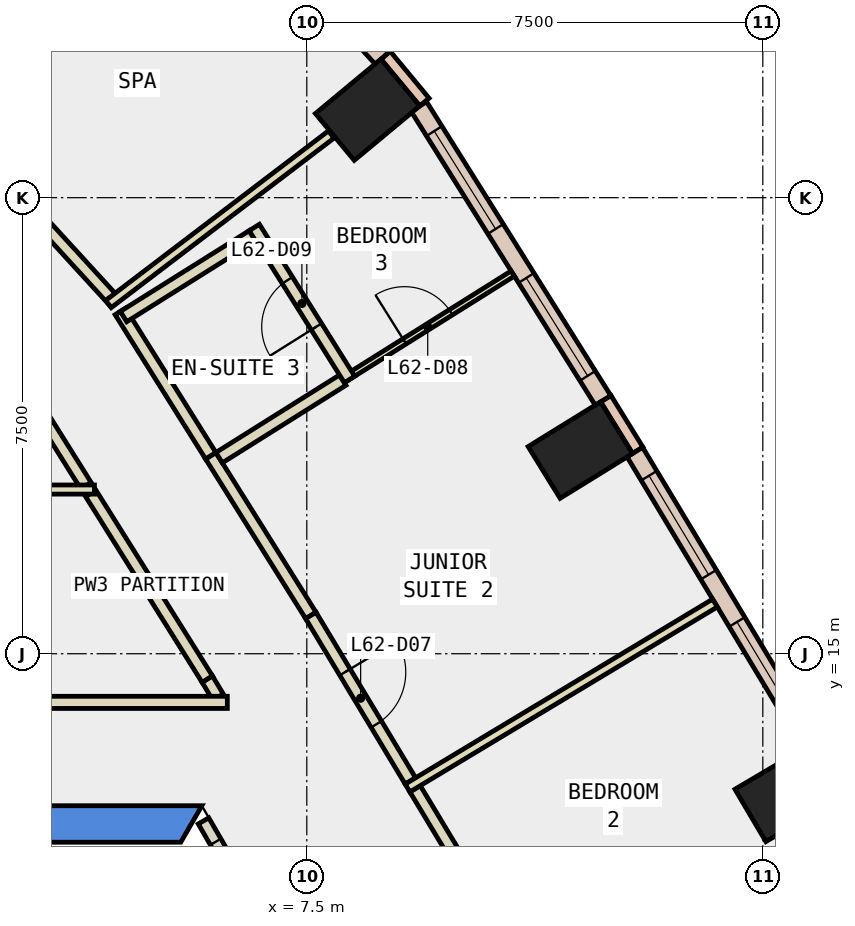
"""IFC4 building model, lengths in metres.
Left out: names, types, materials, properties, quantities, classifications, styles, units other than length and angle.
Written with IfcOpenShell. Run it as: python <this file> out.ifc"""

import sys

from ifc_helpers import new_model, si_unit, direction, frame, frame_2d, origin, origin_2d, place, context, subcontext, project, spatial, polyline, rectangle, outline, extrude, element, fill, save


model = new_model("IFC4")
c1 = context("Model", 3, precision=1e-05, world=origin(), true_north=direction((0.0, 1.0)))
c2 = subcontext(c1, "Body", "Model", "MODEL_VIEW")
j1 = project(units=[si_unit("LENGTHUNIT", "METRE"), si_unit("PLANEANGLEUNIT", "RADIAN")], contexts=[c1])
p1 = place(None, origin())
s1 = spatial("IfcSite", under=j1, at=p1, CompositionType="ELEMENT")
p2 = place(p1, origin())
s2 = spatial("IfcBuilding", under=s1, at=p2, CompositionType="ELEMENT")
p3 = place(p2, frame((0.0, 0.0, 270.2)))
s3 = spatial("IfcBuildingStorey", under=s2, at=p3, CompositionType="ELEMENT", Elevation=270.2)
for number, where, z_axis, x_axis in (
    (1, (15.399, 12.697, -0.34), (0.0, 0.0, 1.0), (-0.509, 0.861, 0.0)),
    (2, (11.999, 18.349, -0.34), (0.0, 0.0, 1.0), (-0.526, 0.851, 0.0)),
    (3, (8.5, 23.946, -0.34), (0.0, 0.0, 1.0), (-0.639, 0.769, 0.0)),
):
    element("IfcColumn", number, at=place(p3, frame(where, z_axis=z_axis, x_axis=x_axis)), inside=s3, PredefinedType="COLUMN", context=c2, shape_type="SweptSolid", body=[
        extrude(rectangle(XDim=1.0, YDim=1.4, at=origin_2d()), origin(), (0.0, 0.0, 1.0), 3.6),
    ])
p4 = place(p3, frame((0.0, 0.0, -0.34)))
e4 = element("IfcWall", 4, at=p4, inside=s3, PredefinedType="SHEAR", context=c2, shape_type="SweptSolid", body=[
    extrude(outline(polyline([(5.774, 12.5), (-5.774, 12.5), (-5.427, 11.9), (5.427, 11.9), (5.774, 12.5)])), origin(), (0.0, 0.0, 1.0), 3.6),
])
p5 = place(p3, frame((12.943, 18.344, 0.0), z_axis=(0.0, 0.0, 1.0), x_axis=(-0.525825307325, 0.850592585306, 0.0)))
e5 = element("IfcWall", 5, at=p5, inside=s3, PredefinedType="STANDARD", context=c2, shape_type="SweptSolid", body=[
    extrude(rectangle(XDim=1.0, YDim=0.2, at=frame_2d((0.5, 0.0))), origin(), (0.0, 0.0, 1.0), 3.26),
])
p6 = place(p3, frame((9.434, 24.072, 0.0), z_axis=(0.0, 0.0, 1.0), x_axis=(-0.638117112481, 0.769939316283, 0.0)))
e6 = element("IfcWall", 6, at=p6, inside=s3, PredefinedType="STANDARD", context=c2, shape_type="SweptSolid", body=[
    extrude(rectangle(XDim=1.0, YDim=0.2, at=frame_2d((0.5, 0.0))), origin(), (0.0, 0.0, 1.0), 3.26),
])
p7 = place(p3, frame((15.788, 13.506, 0.0), z_axis=(0.0, 0.0, 1.0), x_axis=(-0.515435742129, 0.856928232547, 0.0)))
e7 = element("IfcWall", 7, at=p7, inside=s3, PredefinedType="STANDARD", context=c2, shape_type="SweptSolid", body=[
    extrude(rectangle(XDim=5.613, YDim=0.3, at=frame_2d((2.806, 0.0))), origin(), (0.0, 0.0, 1.0), 3.26),
])
p8 = place(p7, frame((0.453, 0.0, 0.9)))
e8 = element("IfcOpeningElement", 8, at=p8, cuts=e7, PredefinedType="OPENING", context=c2, shape_type="SweptSolid", body=[
    extrude(rectangle(XDim=1.9, YDim=2.0, at=frame_2d((0.95, 1.0))), frame((0.0, 0.16, 0.0), z_axis=(0.0, -1.0, 0.0), x_axis=(1.0, 0.0, 0.0)), (0.0, 0.0, 1.0), 0.32),
])
p9 = place(p7, frame((3.26, 0.0, 0.9)))
e9 = element("IfcOpeningElement", 9, at=p9, cuts=e7, PredefinedType="OPENING", context=c2, shape_type="SweptSolid", body=[
    extrude(rectangle(XDim=1.9, YDim=2.0, at=frame_2d((0.95, 1.0))), frame((0.0, 0.16, 0.0), z_axis=(0.0, -1.0, 0.0), x_axis=(1.0, 0.0, 0.0)), (0.0, 0.0, 1.0), 0.32),
])
p10 = place(p3, frame((12.372, 19.166, 0.0), z_axis=(0.0, 0.0, 1.0), x_axis=(-0.531137483242, 0.847285650708, 0.0)))
e10 = element("IfcWall", 10, at=p10, inside=s3, PredefinedType="STANDARD", context=c2, shape_type="SweptSolid", body=[
    extrude(rectangle(XDim=5.703, YDim=0.3, at=frame_2d((2.852, 0.0))), origin(), (0.0, 0.0, 1.0), 3.26),
])
p11 = place(p10, frame((0.476, 0.0, 0.9)))
e11 = element("IfcOpeningElement", 11, at=p11, cuts=e10, PredefinedType="OPENING", context=c2, shape_type="SweptSolid", body=[
    extrude(rectangle(XDim=1.9, YDim=2.0, at=frame_2d((0.95, 1.0))), frame((0.0, 0.16, 0.0), z_axis=(0.0, -1.0, 0.0), x_axis=(1.0, 0.0, 0.0)), (0.0, 0.0, 1.0), 0.32),
])
p12 = place(p10, frame((3.327, 0.0, 0.9)))
e12 = element("IfcOpeningElement", 12, at=p12, cuts=e10, PredefinedType="OPENING", context=c2, shape_type="SweptSolid", body=[
    extrude(rectangle(XDim=1.9, YDim=2.0, at=frame_2d((0.95, 1.0))), frame((0.0, 0.16, 0.0), z_axis=(0.0, -1.0, 0.0), x_axis=(1.0, 0.0, 0.0)), (0.0, 0.0, 1.0), 0.32),
])
p13 = place(p3, frame((8.739, 24.794, 0.0), z_axis=(0.0, 0.0, 1.0), x_axis=(-0.675143863554, 0.737686087374, 0.0)))
e13 = element("IfcWall", 13, at=p13, inside=s3, PredefinedType="STANDARD", context=c2, shape_type="SweptSolid", body=[
    extrude(rectangle(XDim=4.38, YDim=0.3, at=frame_2d((2.19, 0.0))), origin(), (0.0, 0.0, 1.0), 3.26),
])
p14 = place(p13, frame((1.49, 0.0, 0.9)))
e14 = element("IfcOpeningElement", 14, at=p14, cuts=e13, PredefinedType="OPENING", context=c2, shape_type="SweptSolid", body=[
    extrude(rectangle(XDim=1.4, YDim=2.0, at=frame_2d((0.7, 1.0))), frame((0.0, 0.16, 0.0), z_axis=(0.0, -1.0, 0.0), x_axis=(1.0, 0.0, 0.0)), (0.0, 0.0, 1.0), 0.32),
])
p15 = place(p3, frame((6.041, 14.286, 0.0), z_axis=(0.0, 0.0, 1.0), x_axis=(-0.513873647624, 0.857865883619, 0.0)))
e15 = element("IfcWall", 15, at=p15, inside=s3, PredefinedType="PARTITIONING", context=c2, shape_type="SweptSolid", body=[
    extrude(rectangle(XDim=0.346, YDim=0.2, at=frame_2d((0.173, 0.0))), origin(), (0.0, 0.0, 1.0), 3.26),
])
p16 = place(p3, frame((5.863, 14.583, 0.0), z_axis=(0.0, 0.0, 1.0), x_axis=(-0.531380509042, 0.847133256702, 0.0)))
e16 = element("IfcWall", 16, at=p16, inside=s3, PredefinedType="PARTITIONING", context=c2, shape_type="SweptSolid", body=[
    extrude(rectangle(XDim=3.604, YDim=0.2, at=frame_2d((1.802, 0.0))), origin(), (0.0, 0.0, 1.0), 3.26),
])
p17 = place(p3, frame((3.868, 17.764, 0.0), z_axis=(0.0, 0.0, 1.0), x_axis=(-0.531062870102, 0.847332418829, 0.0)))
e17 = element("IfcWall", 17, at=p17, inside=s3, PredefinedType="PARTITIONING", context=c2, shape_type="SweptSolid", body=[
    extrude(rectangle(XDim=2.062, YDim=0.2, at=frame_2d((1.031, 0.0))), origin(), (0.0, 0.0, 1.0), 3.26),
])
p18 = place(p3, frame((9.281, 12.779, 0.0), z_axis=(0.0, 0.0, 1.0), x_axis=(0.515568955032, -0.856848091908, 0.0)))
e18 = element("IfcWall", 18, at=p18, inside=s3, PredefinedType="PARTITIONING", context=c2, shape_type="SweptSolid", body=[
    extrude(rectangle(XDim=3.177, YDim=0.2, at=frame_2d((1.588, 0.0))), origin(), (0.0, 0.0, 1.0), 3.26),
])
p19 = place(p3, frame((5.92, 18.256, 0.0), z_axis=(0.0, 0.0, 1.0), x_axis=(0.531152062518, -0.84727651123, 0.0)))
e19 = element("IfcWall", 19, at=p19, inside=s3, PredefinedType="PARTITIONING", context=c2, shape_type="SweptSolid", body=[
    extrude(rectangle(XDim=3.101, YDim=0.2, at=frame_2d((1.55, 0.0))), origin(), (0.0, 0.0, 1.0), 3.26),
])
p20 = place(p3, frame((7.567, 15.629, 0.0), z_axis=(0.0, 0.0, 1.0), x_axis=(0.51556943596, -0.856847802532, 0.0)))
e20 = element("IfcWall", 20, at=p20, inside=s3, PredefinedType="PARTITIONING", context=c2, shape_type="SweptSolid", body=[
    extrude(rectangle(XDim=3.176, YDim=0.2, at=frame_2d((1.588, 0.0))), origin(), (0.0, 0.0, 1.0), 3.26),
])
p21 = place(p20, frame((1.088, 0.0, 0.0)))
e21 = element("IfcOpeningElement", 21, at=p21, cuts=e20, PredefinedType="OPENING", context=c2, shape_type="SweptSolid", body=[
    extrude(rectangle(XDim=1.0, YDim=2.1, at=frame_2d((0.5, 1.05))), frame((0.0, 0.11, 0.0), z_axis=(0.0, -1.0, 0.0), x_axis=(1.0, 0.0, 0.0)), (0.0, 0.0, 1.0), 0.22),
])
p22 = place(p3, frame((4.433, 20.628, 0.0), z_axis=(0.0, 0.0, 1.0), x_axis=(0.531135189756, -0.84728708842, 0.0)))
e22 = element("IfcWall", 22, at=p22, inside=s3, PredefinedType="PARTITIONING", context=c2, shape_type="SweptSolid", body=[
    extrude(rectangle(XDim=2.799, YDim=0.2, at=frame_2d((1.4, 0.0))), origin(), (0.0, 0.0, 1.0), 3.26),
])
p23 = place(p3, frame((2.084, 23.253, 0.0), z_axis=(0.0, 0.0, 1.0), x_axis=(0.675074517272, -0.737749548377, 0.0)))
e23 = element("IfcWall", 23, at=p23, inside=s3, PredefinedType="PARTITIONING", context=c2, shape_type="SweptSolid", body=[
    extrude(rectangle(XDim=3.334, YDim=0.2, at=frame_2d((1.667, 0.0))), origin(), (0.0, 0.0, 1.0), 3.26),
])
p24 = place(p3, frame((9.157, 12.792, 0.0), z_axis=(0.0, 0.0, 1.0), x_axis=(0.856933793276, 0.515426497129, 0.0)))
e24 = element("IfcWall", 24, at=p24, inside=s3, PredefinedType="PARTITIONING", context=c2, shape_type="SweptSolid", body=[
    extrude(rectangle(XDim=5.9, YDim=0.15, at=frame_2d((2.95, 0.0))), origin(), (0.0, 0.0, 1.0), 3.26),
])
p25 = place(p3, frame((8.091, 19.499, 0.0), z_axis=(0.0, 0.0, 1.0), x_axis=(0.847249319986, 0.53119543464, 0.0)))
e25 = element("IfcWall", 25, at=p25, inside=s3, PredefinedType="PARTITIONING", context=c2, shape_type="SweptSolid", body=[
    extrude(rectangle(XDim=3.3, YDim=0.1, at=frame_2d((1.65, 0.0))), origin(), (0.0, 0.0, 1.0), 3.26),
])
p26 = place(p25, frame((1.2, 0.0, 0.0)))
e26 = element("IfcOpeningElement", 26, at=p26, cuts=e25, PredefinedType="OPENING", context=c2, shape_type="SweptSolid", body=[
    extrude(rectangle(XDim=0.9, YDim=2.1, at=frame_2d((0.45, 1.05))), frame((0.0, 0.06, 0.0), z_axis=(0.0, -1.0, 0.0), x_axis=(1.0, 0.0, 0.0)), (0.0, 0.0, 1.0), 0.12),
])
p27 = place(p3, frame((6.058, 18.224, 0.0), z_axis=(0.0, 0.0, 1.0), x_axis=(0.847191403331, 0.531287799711, 0.0)))
e27 = element("IfcWall", 27, at=p27, inside=s3, PredefinedType="PARTITIONING", context=c2, shape_type="SweptSolid", body=[
    extrude(rectangle(XDim=2.4, YDim=0.2, at=frame_2d((1.2, 0.0))), origin(), (0.0, 0.0, 1.0), 3.26),
])
p28 = place(p3, frame((8.203, 19.51, 0.0), z_axis=(0.0, 0.0, 1.0), x_axis=(-0.531218552952, 0.847234825181, 0.0)))
e28 = element("IfcWall", 28, at=p28, inside=s3, PredefinedType="PARTITIONING", context=c2, shape_type="SweptSolid", body=[
    extrude(rectangle(XDim=2.95, YDim=0.2, at=frame_2d((1.475, 0.0))), origin(), (0.0, 0.0, 1.0), 3.26),
])
p29 = place(p28, frame((1.025, 0.0, 0.0)))
e29 = element("IfcOpeningElement", 29, at=p29, cuts=e28, PredefinedType="OPENING", context=c2, shape_type="SweptSolid", body=[
    extrude(rectangle(XDim=0.9, YDim=2.1, at=frame_2d((0.45, 1.05))), frame((0.0, 0.11, 0.0), z_axis=(0.0, -1.0, 0.0), x_axis=(1.0, 0.0, 0.0)), (0.0, 0.0, 1.0), 0.22),
])
p30 = place(p3, frame((6.604, 21.871, 0.0), z_axis=(0.0, 0.0, 1.0), x_axis=(-0.847377617561, -0.530990746866, 0.0)))
e30 = element("IfcWall", 30, at=p30, inside=s3, PredefinedType="PARTITIONING", context=c2, shape_type="SweptSolid", body=[
    extrude(rectangle(XDim=2.499, YDim=0.2, at=frame_2d((1.25, 0.0))), origin(), (0.0, 0.0, 1.0), 3.26),
])
p31 = place(p3, frame((4.238, 20.751, 0.0), z_axis=(0.0, 0.0, 1.0), x_axis=(0.795806473987, 0.605551034976, 0.0)))
e31 = element("IfcWall", 31, at=p31, inside=s3, PredefinedType="PARTITIONING", context=c2, shape_type="SweptSolid", body=[
    extrude(rectangle(XDim=4.604, YDim=0.15, at=frame_2d((2.302, 0.0))), origin(), (0.0, 0.0, 1.0), 3.26),
])
p32 = place(p3, frame((6.699, 10.697, 0.0), z_axis=(0.0, 0.0, 1.0), x_axis=(-0.499914839587, 0.866074565589, 0.0)))
e32 = element("IfcWall", 32, at=p32, inside=s3, PredefinedType="PARTITIONING", context=c2, shape_type="SweptSolid", body=[
    extrude(rectangle(XDim=1.794, YDim=0.2, at=frame_2d((0.897, 0.0))), origin(), (0.0, 0.0, 1.0), 2.4),
])
p33 = place(p32, frame((0.397, 0.0, 0.0)))
e33 = element("IfcOpeningElement", 33, at=p33, cuts=e32, PredefinedType="OPENING", context=c2, shape_type="SweptSolid", body=[
    extrude(rectangle(XDim=1.0, YDim=2.1, at=frame_2d((0.5, 1.05))), frame((0.0, 0.11, 0.0), z_axis=(0.0, -1.0, 0.0), x_axis=(1.0, 0.0, 0.0)), (0.0, 0.0, 1.0), 0.22),
])
p34 = place(p3, frame((0.4, 14.2, 0.0), z_axis=(0.0, 0.0, 1.0), x_axis=(1.0, 0.0, 0.0)))
e34 = element("IfcWall", 34, at=p34, inside=s3, PredefinedType="PARTITIONING", context=c2, shape_type="SweptSolid", body=[
    extrude(rectangle(XDim=5.793, YDim=0.2, at=frame_2d((2.896, 0.0))), origin(), (0.0, 0.0, 1.0), 3.26),
])
p35 = place(p34, frame((0.095, 0.0, 0.0)))
e35 = element("IfcOpeningElement", 35, at=p35, cuts=e34, PredefinedType="OPENING", context=c2, shape_type="SweptSolid", body=[
    extrude(rectangle(XDim=1.0, YDim=2.1, at=frame_2d((0.5, 1.05))), frame((0.0, 0.11, 0.0), z_axis=(0.0, -1.0, 0.0), x_axis=(1.0, 0.0, 0.0)), (0.0, 0.0, 1.0), 0.22),
])
p36 = place(p3, frame((0.4, 17.7, 0.0), z_axis=(0.0, 0.0, 1.0), x_axis=(1.0, 0.0, 0.0)))
e36 = element("IfcWall", 36, at=p36, inside=s3, PredefinedType="PARTITIONING", context=c2, shape_type="SweptSolid", body=[
    extrude(rectangle(XDim=3.608, YDim=0.15, at=frame_2d((1.804, 0.0))), origin(), (0.0, 0.0, 1.0), 3.26),
])
p37 = place(p8, origin())
e37 = element("IfcWindow", 37, at=p37, inside=s3, PartitioningType="SINGLE_PANEL", PredefinedType="WINDOW", context=c2, shape_type="SweptSolid", body=[
    extrude(rectangle(XDim=1.9, YDim=2.0, at=frame_2d((0.95, 1.0))), frame((0.0, 0.03, 0.0), z_axis=(0.0, -1.0, 0.0), x_axis=(1.0, 0.0, 0.0)), (0.0, 0.0, 1.0), 0.06),
])
fill(e8, e37)
p38 = place(p9, origin())
e38 = element("IfcWindow", 38, at=p38, inside=s3, PartitioningType="SINGLE_PANEL", PredefinedType="WINDOW", context=c2, shape_type="SweptSolid", body=[
    extrude(rectangle(XDim=1.9, YDim=2.0, at=frame_2d((0.95, 1.0))), frame((0.0, 0.03, 0.0), z_axis=(0.0, -1.0, 0.0), x_axis=(1.0, 0.0, 0.0)), (0.0, 0.0, 1.0), 0.06),
])
fill(e9, e38)
p39 = place(p11, origin())
e39 = element("IfcWindow", 39, at=p39, inside=s3, PartitioningType="SINGLE_PANEL", PredefinedType="WINDOW", context=c2, shape_type="SweptSolid", body=[
    extrude(rectangle(XDim=1.9, YDim=2.0, at=frame_2d((0.95, 1.0))), frame((0.0, 0.03, 0.0), z_axis=(0.0, -1.0, 0.0), x_axis=(1.0, 0.0, 0.0)), (0.0, 0.0, 1.0), 0.06),
])
fill(e11, e39)
p40 = place(p12, origin())
e40 = element("IfcWindow", 40, at=p40, inside=s3, PartitioningType="SINGLE_PANEL", PredefinedType="WINDOW", context=c2, shape_type="SweptSolid", body=[
    extrude(rectangle(XDim=1.9, YDim=2.0, at=frame_2d((0.95, 1.0))), frame((0.0, 0.03, 0.0), z_axis=(0.0, -1.0, 0.0), x_axis=(1.0, 0.0, 0.0)), (0.0, 0.0, 1.0), 0.06),
])
fill(e12, e40)
p41 = place(p21, origin())
e41 = element("IfcDoor", 41, at=p41, inside=s3, OperationType="SINGLE_SWING_RIGHT", PredefinedType="DOOR", context=c2, shape_type="SweptSolid", body=[
    extrude(rectangle(XDim=1.0, YDim=2.1, at=frame_2d((0.5, 1.05))), frame((0.0, 0.025, 0.0), z_axis=(0.0, -1.0, 0.0), x_axis=(1.0, 0.0, 0.0)), (0.0, 0.0, 1.0), 0.05),
])
fill(e21, e41)
p42 = place(p26, origin())
e42 = element("IfcDoor", 42, at=p42, inside=s3, OperationType="SINGLE_SWING_LEFT", PredefinedType="DOOR", context=c2, shape_type="SweptSolid", body=[
    extrude(rectangle(XDim=0.9, YDim=2.1, at=frame_2d((0.45, 1.05))), frame((0.0, 0.025, 0.0), z_axis=(0.0, -1.0, 0.0), x_axis=(1.0, 0.0, 0.0)), (0.0, 0.0, 1.0), 0.05),
])
fill(e26, e42)
p43 = place(p29, origin())
e43 = element("IfcDoor", 43, at=p43, inside=s3, OperationType="SINGLE_SWING_RIGHT", PredefinedType="DOOR", context=c2, shape_type="SweptSolid", body=[
    extrude(rectangle(XDim=0.9, YDim=2.1, at=frame_2d((0.45, 1.05))), frame((0.0, 0.025, 0.0), z_axis=(0.0, -1.0, 0.0), x_axis=(1.0, 0.0, 0.0)), (0.0, 0.0, 1.0), 0.05),
])
fill(e29, e43)
p44 = place(p33, origin())
e44 = element("IfcDoor", 44, at=p44, inside=s3, OperationType="SINGLE_SWING_LEFT", PredefinedType="DOOR", context=c2, shape_type="SweptSolid", body=[
    extrude(rectangle(XDim=1.0, YDim=2.1, at=frame_2d((0.5, 1.05))), frame((0.0, 0.025, 0.0), z_axis=(0.0, -1.0, 0.0), x_axis=(1.0, 0.0, 0.0)), (0.0, 0.0, 1.0), 0.05),
])
fill(e33, e44)
save(model, sys.argv[1])
